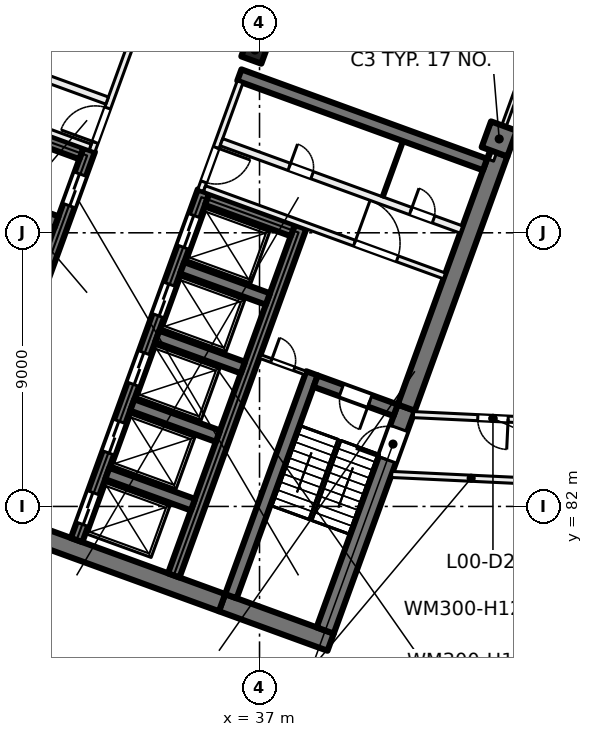
"""IFC4 building model, lengths in metres.
Left out: names, types, materials, properties, quantities, classifications, styles, units other than length and angle.
Written with IfcOpenShell. Run it as: python <this file> out.ifc"""

import sys

from ifc_helpers import new_model, si_unit, direction, frame, frame_2d, origin, origin_2d, place, context, subcontext, project, spatial, rectangle, extrude, element, fill, save


model = new_model("IFC4")
c1 = context("Model", 3, precision=1e-05, world=origin(), true_north=direction((0.0, 1.0)))
c2 = subcontext(c1, "Body", "Model", "MODEL_VIEW")
j1 = project(units=[si_unit("LENGTHUNIT", "METRE"), si_unit("PLANEANGLEUNIT", "RADIAN")], contexts=[c1])
p1 = place(None, origin())
s1 = spatial("IfcSite", under=j1, at=p1, CompositionType="ELEMENT")
p2 = place(p1, origin())
s2 = spatial("IfcBuilding", under=s1, at=p2, CompositionType="ELEMENT")
p3 = place(p2, origin())
s3 = spatial("IfcBuildingStorey", under=s2, at=p3, CompositionType="ELEMENT", Elevation=0.0)
p4 = place(p3, frame((36.849, 97.011, 0.0), z_axis=(0.0, 0.0, 1.0), x_axis=(-0.342020143326, -0.939692620786, 0.0)))
e1 = element("IfcColumn", 1, at=p4, inside=s3, PredefinedType="COLUMN", context=c2, shape_type="SweptSolid", body=[
    extrude(rectangle(XDim=0.7, YDim=0.7, at=origin_2d()), origin(), (0.0, 0.0, 1.0), 7.5),
])
p5 = place(p3, frame((44.884, 94.087, 0.0), z_axis=(0.0, 0.0, 1.0), x_axis=(-0.342020143326, -0.939692620786, 0.0)))
e2 = element("IfcColumn", 2, at=p5, inside=s3, PredefinedType="COLUMN", context=c2, shape_type="SweptSolid", body=[
    extrude(rectangle(XDim=0.9, YDim=0.9, at=origin_2d()), origin(), (0.0, 0.0, 1.0), 7.5),
])
p6 = place(p3, frame((39.338, 77.535, 0.0), z_axis=(0.0, 0.0, 1.0), x_axis=(-0.939701471648, 0.341995824804, 0.0)))
e3 = element("IfcWall", 3, at=p6, inside=s3, PredefinedType="SHEAR", context=c2, shape_type="SweptSolid", body=[
    extrude(rectangle(XDim=3.8, YDim=0.6, at=frame_2d((1.9, 0.0))), origin(), (0.0, 0.0, 1.0), 7.5),
])
p7 = place(p3, frame((35.767, 78.835, 0.0), z_axis=(0.0, 0.0, 1.0), x_axis=(-0.939692894512, 0.342019391267, 0.0)))
e4 = element("IfcWall", 4, at=p7, inside=s3, PredefinedType="SHEAR", context=c2, shape_type="SweptSolid", body=[
    extrude(rectangle(XDim=14.4, YDim=0.6, at=frame_2d((7.2, 0.0))), origin(), (0.0, 0.0, 1.0), 7.5),
])
p8 = place(p3, frame((39.159, 77.92, 0.0), z_axis=(0.0, 0.0, 1.0), x_axis=(0.342016982193, 0.939693771338, 0.0)))
e5 = element("IfcWall", 5, at=p8, inside=s3, PredefinedType="SHEAR", context=c2, shape_type="SweptSolid", body=[
    extrude(rectangle(XDim=7.8, YDim=0.6, at=frame_2d((3.9, 0.0))), origin(), (0.0, 0.0, 1.0), 7.5),
])
p9 = place(p8, frame((5.975, 0.0, 0.0)))
e6 = element("IfcOpeningElement", 6, at=p9, cuts=e5, PredefinedType="OPENING", context=c2, shape_type="SweptSolid", body=[
    extrude(rectangle(XDim=1.1, YDim=2.1, at=frame_2d((0.55, 1.05))), frame((0.0, 0.31, 0.0), z_axis=(0.0, -1.0, 0.0), x_axis=(1.0, 0.0, 0.0)), (0.0, 0.0, 1.0), 0.62),
])
p10 = place(p3, frame((41.827, 85.249, 0.0), z_axis=(0.0, 0.0, 1.0), x_axis=(0.342016162452, 0.939694069696, 0.0)))
e7 = element("IfcWall", 7, at=p10, inside=s3, PredefinedType="SHEAR", context=c2, shape_type="SweptSolid", body=[
    extrude(rectangle(XDim=8.9, YDim=0.6, at=frame_2d((4.45, 0.0))), origin(), (0.0, 0.0, 1.0), 7.5),
])
p11 = place(p3, frame((36.058, 79.048, 0.0), z_axis=(0.0, 0.0, 1.0), x_axis=(0.342016982193, 0.939693771338, 0.0)))
e8 = element("IfcWall", 8, at=p11, inside=s3, PredefinedType="SHEAR", context=c2, shape_type="SweptSolid", body=[
    extrude(rectangle(XDim=7.8, YDim=0.4, at=frame_2d((3.9, 0.0))), origin(), (0.0, 0.0, 1.0), 7.5),
])
p12 = place(p3, frame((41.476, 85.164, 0.0), z_axis=(0.0, 0.0, 1.0), x_axis=(-0.939678810556, 0.342058084236, 0.0)))
e9 = element("IfcWall", 9, at=p12, inside=s3, PredefinedType="SHEAR", context=c2, shape_type="SweptSolid", body=[
    extrude(rectangle(XDim=2.8, YDim=0.4, at=frame_2d((1.4, 0.0))), origin(), (0.0, 0.0, 1.0), 7.5),
])
p13 = place(p12, frame((0.9, 0.0, 0.0)))
e10 = element("IfcOpeningElement", 10, at=p13, cuts=e9, PredefinedType="OPENING", context=c2, shape_type="SweptSolid", body=[
    extrude(rectangle(XDim=1.0, YDim=2.1, at=frame_2d((0.5, 1.05))), frame((0.0, 0.21, 0.0), z_axis=(0.0, -1.0, 0.0), x_axis=(1.0, 0.0, 0.0)), (0.0, 0.0, 1.0), 0.42),
])
p14 = place(p3, frame((30.984, 80.895, 0.0), z_axis=(0.0, 0.0, 1.0), x_axis=(0.342021021735, 0.939692301071, 0.0)))
e11 = element("IfcWall", 11, at=p14, inside=s3, PredefinedType="SHEAR", context=c2, shape_type="SweptSolid", body=[
    extrude(rectangle(XDim=12.2, YDim=0.4, at=frame_2d((6.1, 0.0))), origin(), (0.0, 0.0, 1.0), 7.5),
])
p15 = place(p14, frame((0.55, 0.0, 0.0)))
e12 = element("IfcOpeningElement", 12, at=p15, cuts=e11, PredefinedType="OPENING", context=c2, shape_type="SweptSolid", body=[
    extrude(rectangle(XDim=1.1, YDim=2.1, at=frame_2d((0.55, 1.05))), frame((0.0, 0.21, 0.0), z_axis=(0.0, -1.0, 0.0), x_axis=(1.0, 0.0, 0.0)), (0.0, 0.0, 1.0), 0.42),
])
p16 = place(p14, frame((3.05, 0.0, 0.0)))
e13 = element("IfcOpeningElement", 13, at=p16, cuts=e11, PredefinedType="OPENING", context=c2, shape_type="SweptSolid", body=[
    extrude(rectangle(XDim=1.1, YDim=2.1, at=frame_2d((0.55, 1.05))), frame((0.0, 0.21, 0.0), z_axis=(0.0, -1.0, 0.0), x_axis=(1.0, 0.0, 0.0)), (0.0, 0.0, 1.0), 0.42),
])
p17 = place(p14, frame((5.45, 0.0, 0.0)))
e14 = element("IfcOpeningElement", 14, at=p17, cuts=e11, PredefinedType="OPENING", context=c2, shape_type="SweptSolid", body=[
    extrude(rectangle(XDim=1.1, YDim=2.1, at=frame_2d((0.55, 1.05))), frame((0.0, 0.21, 0.0), z_axis=(0.0, -1.0, 0.0), x_axis=(1.0, 0.0, 0.0)), (0.0, 0.0, 1.0), 0.42),
])
p18 = place(p14, frame((7.85, 0.0, 0.0)))
e15 = element("IfcOpeningElement", 15, at=p18, cuts=e11, PredefinedType="OPENING", context=c2, shape_type="SweptSolid", body=[
    extrude(rectangle(XDim=1.1, YDim=2.1, at=frame_2d((0.55, 1.05))), frame((0.0, 0.21, 0.0), z_axis=(0.0, -1.0, 0.0), x_axis=(1.0, 0.0, 0.0)), (0.0, 0.0, 1.0), 0.42),
])
p19 = place(p14, frame((10.25, 0.0, 0.0)))
e16 = element("IfcOpeningElement", 16, at=p19, cuts=e11, PredefinedType="OPENING", context=c2, shape_type="SweptSolid", body=[
    extrude(rectangle(XDim=1.1, YDim=2.1, at=frame_2d((0.55, 1.05))), frame((0.0, 0.21, 0.0), z_axis=(0.0, -1.0, 0.0), x_axis=(1.0, 0.0, 0.0)), (0.0, 0.0, 1.0), 0.42),
])
p20 = place(p3, frame((34.178, 79.732, 0.0), z_axis=(0.0, 0.0, 1.0), x_axis=(0.342014590177, 0.939694641948, 0.0)))
e17 = element("IfcWall", 17, at=p20, inside=s3, PredefinedType="SHEAR", context=c2, shape_type="SweptSolid", body=[
    extrude(rectangle(XDim=12.2, YDim=0.4, at=frame_2d((6.1, 0.0))), origin(), (0.0, 0.0, 1.0), 7.5),
])
for number, where, z_axis, x_axis in (
    (18, (34.812, 82.056, 0.0), (0.0, 0.0, 1.0), (-0.94, 0.342, 0.0)),
    (19, (35.632, 84.311, 0.0), (0.0, 0.0, 1.0), (-0.94, 0.342, 0.0)),
    (20, (36.453, 86.566, 0.0), (0.0, 0.0, 1.0), (-0.94, 0.342, 0.0)),
    (21, (37.274, 88.822, 0.0), (0.0, 0.0, 1.0), (-0.94, 0.342, 0.0)),
):
    element("IfcWall", number, at=place(p3, frame(where, z_axis=z_axis, x_axis=x_axis)), inside=s3, PredefinedType="SHEAR", context=c2, shape_type="SweptSolid", body=[
        extrude(rectangle(XDim=3.0, YDim=0.4, at=frame_2d((1.5, 0.0))), origin(), (0.0, 0.0, 1.0), 7.5),
    ])
p21 = place(p3, frame((38.095, 91.077, 0.0), z_axis=(0.0, 0.0, 1.0), x_axis=(-0.939676934218, 0.342063238742, 0.0)))
e22 = element("IfcWall", 22, at=p21, inside=s3, PredefinedType="SHEAR", context=c2, shape_type="SweptSolid", body=[
    extrude(rectangle(XDim=3.0, YDim=0.4, at=frame_2d((1.5, 0.0))), origin(), (0.0, 0.0, 1.0), 7.5),
])
p22 = place(p3, frame((27.225, 82.263, 0.0), z_axis=(0.0, 0.0, 1.0), x_axis=(0.342014590177, 0.939694641948, 0.0)))
e23 = element("IfcWall", 23, at=p22, inside=s3, PredefinedType="SHEAR", context=c2, shape_type="SweptSolid", body=[
    extrude(rectangle(XDim=12.2, YDim=0.4, at=frame_2d((6.1, 0.0))), origin(), (0.0, 0.0, 1.0), 7.5),
])
p23 = place(p22, frame((10.25, 0.0, 0.0)))
e24 = element("IfcOpeningElement", 24, at=p23, cuts=e23, PredefinedType="OPENING", context=c2, shape_type="SweptSolid", body=[
    extrude(rectangle(XDim=1.1, YDim=2.1, at=frame_2d((0.55, 1.05))), frame((0.0, 0.21, 0.0), z_axis=(0.0, -1.0, 0.0), x_axis=(1.0, 0.0, 0.0)), (0.0, 0.0, 1.0), 0.42),
])
p24 = place(p22, frame((0.7, 0.0, 0.0)))
e25 = element("IfcOpeningElement", 25, at=p24, cuts=e23, PredefinedType="OPENING", context=c2, shape_type="SweptSolid", body=[
    extrude(rectangle(XDim=0.8, YDim=2.1, at=frame_2d((0.4, 1.05))), frame((0.0, 0.21, 0.0), z_axis=(0.0, -1.0, 0.0), x_axis=(1.0, 0.0, 0.0)), (0.0, 0.0, 1.0), 0.42),
])
for number, where, z_axis, x_axis in (
    (26, (30.32, 91.353, 0.0), (0.0, 0.0, 1.0), (-0.94, 0.342, 0.0)),
    (27, (31.141, 93.608, 0.0), (0.0, 0.0, 1.0), (-0.94, 0.342, 0.0)),
):
    element("IfcWall", number, at=place(p3, frame(where, z_axis=z_axis, x_axis=x_axis)), inside=s3, PredefinedType="SHEAR", context=c2, shape_type="SweptSolid", body=[
        extrude(rectangle(XDim=3.0, YDim=0.4, at=frame_2d((1.5, 0.0))), origin(), (0.0, 0.0, 1.0), 7.5),
    ])
p25 = place(p3, frame((44.418, 93.245, 0.0), z_axis=(0.0, 0.0, 1.0), x_axis=(-0.93969060187, 0.342025690201, 0.0)))
e28 = element("IfcWall", 28, at=p25, inside=s3, PredefinedType="SHEAR", context=c2, shape_type="SweptSolid", body=[
    extrude(rectangle(XDim=8.6, YDim=0.4, at=frame_2d((4.3, 0.0))), origin(), (0.0, 0.0, 1.0), 7.5),
])
p26 = place(p3, frame((31.491, 93.693, 0.0), z_axis=(0.0, 0.0, 1.0), x_axis=(0.341995824804, 0.939701471648, 0.0)))
e29 = element("IfcWall", 29, at=p26, inside=s3, PredefinedType="PARTITIONING", context=c2, shape_type="SweptSolid", body=[
    extrude(rectangle(XDim=3.8, YDim=0.2, at=frame_2d((1.9, 0.0))), origin(), (0.0, 0.0, 1.0), 7.1),
])
p27 = place(p26, frame((0.3, 0.0, 0.0)))
e30 = element("IfcOpeningElement", 30, at=p27, cuts=e29, PredefinedType="OPENING", context=c2, shape_type="SweptSolid", body=[
    extrude(rectangle(XDim=1.2, YDim=2.1, at=frame_2d((0.6, 1.05))), frame((0.0, 0.11, 0.0), z_axis=(0.0, -1.0, 0.0), x_axis=(1.0, 0.0, 0.0)), (0.0, 0.0, 1.0), 0.22),
])
p28 = place(p3, frame((23.538, 96.694, 0.0), z_axis=(0.0, 0.0, 1.0), x_axis=(0.939691552312, -0.342023078919, 0.0)))
e31 = element("IfcWall", 31, at=p28, inside=s3, PredefinedType="PARTITIONING", context=c2, shape_type="SweptSolid", body=[
    extrude(rectangle(XDim=8.4, YDim=0.2, at=frame_2d((4.2, 0.0))), origin(), (0.0, 0.0, 1.0), 7.1),
])
p29 = place(p28, frame((1.65, 0.0, 0.0)))
e32 = element("IfcOpeningElement", 32, at=p29, cuts=e31, PredefinedType="OPENING", context=c2, shape_type="SweptSolid", body=[
    extrude(rectangle(XDim=1.5, YDim=2.1, at=frame_2d((0.75, 1.05))), frame((0.0, 0.11, 0.0), z_axis=(0.0, -1.0, 0.0), x_axis=(1.0, 0.0, 0.0)), (0.0, 0.0, 1.0), 0.22),
])
p30 = place(p3, frame((24.094, 98.221, 0.0), z_axis=(0.0, 0.0, 1.0), x_axis=(0.939691552312, -0.342023078919, 0.0)))
e33 = element("IfcWall", 33, at=p30, inside=s3, PredefinedType="PARTITIONING", context=c2, shape_type="SweptSolid", body=[
    extrude(rectangle(XDim=8.4, YDim=0.25, at=frame_2d((4.2, 0.0))), origin(), (0.0, 0.0, 1.0), 7.1),
])
p31 = place(p30, frame((3.8, 0.0, 0.0)))
e34 = element("IfcOpeningElement", 34, at=p31, cuts=e33, PredefinedType="OPENING", context=c2, shape_type="SweptSolid", body=[
    extrude(rectangle(XDim=0.8, YDim=2.1, at=frame_2d((0.4, 1.05))), frame((0.0, 0.135, 0.0), z_axis=(0.0, -1.0, 0.0), x_axis=(1.0, 0.0, 0.0)), (0.0, 0.0, 1.0), 0.27),
])
p32 = place(p3, frame((36.362, 95.964, 0.0), z_axis=(0.0, 0.0, 1.0), x_axis=(-0.341995824804, -0.939701471648, 0.0)))
e35 = element("IfcWall", 35, at=p32, inside=s3, PredefinedType="PARTITIONING", context=c2, shape_type="SweptSolid", body=[
    extrude(rectangle(XDim=3.8, YDim=0.2, at=frame_2d((1.9, 0.0))), origin(), (0.0, 0.0, 1.0), 7.1),
])
p33 = place(p32, frame((2.3, 0.0, 0.0)))
e36 = element("IfcOpeningElement", 36, at=p33, cuts=e35, PredefinedType="OPENING", context=c2, shape_type="SweptSolid", body=[
    extrude(rectangle(XDim=1.2, YDim=2.1, at=frame_2d((0.6, 1.05))), frame((0.0, 0.11, 0.0), z_axis=(0.0, -1.0, 0.0), x_axis=(1.0, 0.0, 0.0)), (0.0, 0.0, 1.0), 0.22),
])
p34 = place(p3, frame((35.19, 92.453, 0.0), z_axis=(0.0, 0.0, 1.0), x_axis=(0.939691552312, -0.342023078919, 0.0)))
e37 = element("IfcWall", 37, at=p34, inside=s3, PredefinedType="PARTITIONING", context=c2, shape_type="SweptSolid", body=[
    extrude(rectangle(XDim=8.4, YDim=0.2, at=frame_2d((4.2, 0.0))), origin(), (0.0, 0.0, 1.0), 7.1),
])
p35 = place(p34, frame((5.25, 0.0, 0.0)))
e38 = element("IfcOpeningElement", 38, at=p35, cuts=e37, PredefinedType="OPENING", context=c2, shape_type="SweptSolid", body=[
    extrude(rectangle(XDim=1.5, YDim=2.1, at=frame_2d((0.75, 1.05))), frame((0.0, 0.11, 0.0), z_axis=(0.0, -1.0, 0.0), x_axis=(1.0, 0.0, 0.0)), (0.0, 0.0, 1.0), 0.22),
])
p36 = place(p3, frame((35.746, 93.98, 0.0), z_axis=(0.0, 0.0, 1.0), x_axis=(0.939691552312, -0.342023078919, 0.0)))
e39 = element("IfcWall", 39, at=p36, inside=s3, PredefinedType="PARTITIONING", context=c2, shape_type="SweptSolid", body=[
    extrude(rectangle(XDim=8.4, YDim=0.25, at=frame_2d((4.2, 0.0))), origin(), (0.0, 0.0, 1.0), 7.1),
])
p37 = place(p36, frame((2.375, 0.0, 0.0)))
e40 = element("IfcOpeningElement", 40, at=p37, cuts=e39, PredefinedType="OPENING", context=c2, shape_type="SweptSolid", body=[
    extrude(rectangle(XDim=0.8, YDim=2.1, at=frame_2d((0.4, 1.05))), frame((0.0, 0.135, 0.0), z_axis=(0.0, -1.0, 0.0), x_axis=(1.0, 0.0, 0.0)), (0.0, 0.0, 1.0), 0.27),
])
p38 = place(p36, frame((6.625, 0.0, 0.0)))
e41 = element("IfcOpeningElement", 41, at=p38, cuts=e39, PredefinedType="OPENING", context=c2, shape_type="SweptSolid", body=[
    extrude(rectangle(XDim=0.8, YDim=2.1, at=frame_2d((0.4, 1.05))), frame((0.0, 0.135, 0.0), z_axis=(0.0, -1.0, 0.0), x_axis=(1.0, 0.0, 0.0)), (0.0, 0.0, 1.0), 0.27),
])
p39 = place(p3, frame((37.013, 86.935, 0.0), z_axis=(0.0, 0.0, 1.0), x_axis=(0.939659694648, -0.342110593602, 0.0)))
e42 = element("IfcWall", 42, at=p39, inside=s3, PredefinedType="PARTITIONING", context=c2, shape_type="SweptSolid", body=[
    extrude(rectangle(XDim=1.6, YDim=0.125, at=frame_2d((0.8, 0.0))), origin(), (0.0, 0.0, 1.0), 7.1),
])
p40 = place(p39, frame((0.4, 0.0, 0.0)))
e43 = element("IfcOpeningElement", 43, at=p40, cuts=e42, PredefinedType="OPENING", context=c2, shape_type="SweptSolid", body=[
    extrude(rectangle(XDim=0.8, YDim=2.1, at=frame_2d((0.4, 1.05))), frame((0.0, 0.073, 0.0), z_axis=(0.0, -1.0, 0.0), x_axis=(1.0, 0.0, 0.0)), (0.0, 0.0, 1.0), 0.145),
])
p41 = place(p3, frame((41.718, 94.015, 0.0), z_axis=(0.0, 0.0, 1.0), x_axis=(-0.342064742067, -0.939676386973, 0.0)))
e44 = element("IfcWall", 44, at=p41, inside=s3, PredefinedType="PARTITIONING", context=c2, shape_type="SweptSolid", body=[
    extrude(rectangle(XDim=1.95, YDim=0.1, at=frame_2d((0.975, 0.0))), origin(), (0.0, 0.0, 1.0), 7.1),
])
p42 = place(p3, frame((41.347, 83.052, 0.0), z_axis=(0.0, 0.0, 1.0), x_axis=(0.998867926688, -0.04756958097, 0.0)))
e45 = element("IfcWall", 45, at=p42, inside=s3, PredefinedType="PARTITIONING", context=c2, shape_type="SweptSolid", body=[
    extrude(rectangle(XDim=5.235, YDim=0.2, at=frame_2d((2.617, 0.0))), origin(), (0.0, 0.0, 1.0), 7.1),
])
p43 = place(p3, frame((42.063, 85.02, 0.0), z_axis=(0.0, 0.0, 1.0), x_axis=(0.998868348702, -0.047560718685, 0.0)))
e46 = element("IfcWall", 46, at=p43, inside=s3, PredefinedType="PARTITIONING", context=c2, shape_type="SweptSolid", body=[
    extrude(rectangle(XDim=5.236, YDim=0.2, at=frame_2d((2.618, 0.0))), origin(), (0.0, 0.0, 1.0), 7.1),
])
p44 = place(p43, frame((2.118, 0.0, 0.0)))
e47 = element("IfcOpeningElement", 47, at=p44, cuts=e46, PredefinedType="OPENING", context=c2, shape_type="SweptSolid", body=[
    extrude(rectangle(XDim=1.0, YDim=2.1, at=frame_2d((0.5, 1.05))), frame((0.0, 0.11, 0.0), z_axis=(0.0, -1.0, 0.0), x_axis=(1.0, 0.0, 0.0)), (0.0, 0.0, 1.0), 0.22),
])
p45 = place(p3, frame((44.627, 93.382, 0.0), z_axis=(0.0, 0.0, 1.0), x_axis=(0.342025351501, 0.939690725149, 0.0)))
e48 = element("IfcWall", 48, at=p45, inside=s3, PredefinedType="PARTITIONING", context=c2, shape_type="SweptSolid", body=[
    extrude(rectangle(XDim=5.0, YDim=0.15, at=frame_2d((2.5, 0.0))), origin(), (0.0, 0.0, 1.0), 7.1),
])
p46 = place(p23, origin())
e49 = element("IfcDoor", 49, at=p46, inside=s3, OperationType="DOUBLE_DOOR_SLIDING", PredefinedType="DOOR", context=c2, shape_type="SweptSolid", body=[
    extrude(rectangle(XDim=1.1, YDim=2.1, at=frame_2d((0.55, 1.05))), frame((0.0, 0.025, 0.0), z_axis=(0.0, -1.0, 0.0), x_axis=(1.0, 0.0, 0.0)), (0.0, 0.0, 1.0), 0.05),
])
fill(e24, e49)
p47 = place(p15, origin())
e50 = element("IfcDoor", 50, at=p47, inside=s3, OperationType="DOUBLE_DOOR_SLIDING", PredefinedType="DOOR", context=c2, shape_type="SweptSolid", body=[
    extrude(rectangle(XDim=1.1, YDim=2.1, at=frame_2d((0.55, 1.05))), frame((0.0, 0.025, 0.0), z_axis=(0.0, -1.0, 0.0), x_axis=(1.0, 0.0, 0.0)), (0.0, 0.0, 1.0), 0.05),
])
fill(e12, e50)
p48 = place(p16, origin())
e51 = element("IfcDoor", 51, at=p48, inside=s3, OperationType="DOUBLE_DOOR_SLIDING", PredefinedType="DOOR", context=c2, shape_type="SweptSolid", body=[
    extrude(rectangle(XDim=1.1, YDim=2.1, at=frame_2d((0.55, 1.05))), frame((0.0, 0.025, 0.0), z_axis=(0.0, -1.0, 0.0), x_axis=(1.0, 0.0, 0.0)), (0.0, 0.0, 1.0), 0.05),
])
fill(e13, e51)
p49 = place(p17, origin())
e52 = element("IfcDoor", 52, at=p49, inside=s3, OperationType="DOUBLE_DOOR_SLIDING", PredefinedType="DOOR", context=c2, shape_type="SweptSolid", body=[
    extrude(rectangle(XDim=1.1, YDim=2.1, at=frame_2d((0.55, 1.05))), frame((0.0, 0.025, 0.0), z_axis=(0.0, -1.0, 0.0), x_axis=(1.0, 0.0, 0.0)), (0.0, 0.0, 1.0), 0.05),
])
fill(e14, e52)
p50 = place(p18, origin())
e53 = element("IfcDoor", 53, at=p50, inside=s3, OperationType="DOUBLE_DOOR_SLIDING", PredefinedType="DOOR", context=c2, shape_type="SweptSolid", body=[
    extrude(rectangle(XDim=1.1, YDim=2.1, at=frame_2d((0.55, 1.05))), frame((0.0, 0.025, 0.0), z_axis=(0.0, -1.0, 0.0), x_axis=(1.0, 0.0, 0.0)), (0.0, 0.0, 1.0), 0.05),
])
fill(e15, e53)
p51 = place(p19, origin())
e54 = element("IfcDoor", 54, at=p51, inside=s3, OperationType="DOUBLE_DOOR_SLIDING", PredefinedType="DOOR", context=c2, shape_type="SweptSolid", body=[
    extrude(rectangle(XDim=1.1, YDim=2.1, at=frame_2d((0.55, 1.05))), frame((0.0, 0.025, 0.0), z_axis=(0.0, -1.0, 0.0), x_axis=(1.0, 0.0, 0.0)), (0.0, 0.0, 1.0), 0.05),
])
fill(e16, e54)
p52 = place(p27, origin())
e55 = element("IfcDoor", 55, at=p52, inside=s3, OperationType="DOUBLE_DOOR_SINGLE_SWING", PredefinedType="DOOR", context=c2, shape_type="SweptSolid", body=[
    extrude(rectangle(XDim=1.2, YDim=2.1, at=frame_2d((0.6, 1.05))), frame((0.0, 0.025, 0.0), z_axis=(0.0, -1.0, 0.0), x_axis=(1.0, 0.0, 0.0)), (0.0, 0.0, 1.0), 0.05),
])
fill(e30, e55)
p53 = place(p33, origin())
e56 = element("IfcDoor", 56, at=p53, inside=s3, OperationType="DOUBLE_DOOR_SINGLE_SWING", PredefinedType="DOOR", context=c2, shape_type="SweptSolid", body=[
    extrude(rectangle(XDim=1.2, YDim=2.1, at=frame_2d((0.6, 1.05))), frame((0.0, 0.025, 0.0), z_axis=(0.0, -1.0, 0.0), x_axis=(1.0, 0.0, 0.0)), (0.0, 0.0, 1.0), 0.05),
])
fill(e36, e56)
p54 = place(p35, origin())
e57 = element("IfcDoor", 57, at=p54, inside=s3, OperationType="DOUBLE_DOOR_SINGLE_SWING", PredefinedType="DOOR", context=c2, shape_type="SweptSolid", body=[
    extrude(rectangle(XDim=1.5, YDim=2.1, at=frame_2d((0.75, 1.05))), frame((0.0, 0.025, 0.0), z_axis=(0.0, -1.0, 0.0), x_axis=(1.0, 0.0, 0.0)), (0.0, 0.0, 1.0), 0.05),
])
fill(e38, e57)
p55 = place(p13, origin())
e58 = element("IfcDoor", 58, at=p55, inside=s3, OperationType="SINGLE_SWING_RIGHT", PredefinedType="DOOR", context=c2, shape_type="SweptSolid", body=[
    extrude(rectangle(XDim=1.0, YDim=2.1, at=frame_2d((0.5, 1.05))), frame((0.0, 0.025, 0.0), z_axis=(0.0, -1.0, 0.0), x_axis=(1.0, 0.0, 0.0)), (0.0, 0.0, 1.0), 0.05),
])
fill(e10, e58)
p56 = place(p40, origin())
e59 = element("IfcDoor", 59, at=p56, inside=s3, OperationType="SINGLE_SWING_LEFT", PredefinedType="DOOR", context=c2, shape_type="SweptSolid", body=[
    extrude(rectangle(XDim=0.8, YDim=2.1, at=frame_2d((0.4, 1.05))), frame((0.0, 0.025, 0.0), z_axis=(0.0, -1.0, 0.0), x_axis=(1.0, 0.0, 0.0)), (0.0, 0.0, 1.0), 0.05),
])
fill(e43, e59)
p57 = place(p37, origin())
e60 = element("IfcDoor", 60, at=p57, inside=s3, OperationType="SINGLE_SWING_RIGHT", PredefinedType="DOOR", context=c2, shape_type="SweptSolid", body=[
    extrude(rectangle(XDim=0.8, YDim=2.1, at=frame_2d((0.4, 1.05))), frame((0.0, 0.025, 0.0), z_axis=(0.0, -1.0, 0.0), x_axis=(1.0, 0.0, 0.0)), (0.0, 0.0, 1.0), 0.05),
])
fill(e40, e60)
p58 = place(p38, origin())
e61 = element("IfcDoor", 61, at=p58, inside=s3, OperationType="SINGLE_SWING_LEFT", PredefinedType="DOOR", context=c2, shape_type="SweptSolid", body=[
    extrude(rectangle(XDim=0.8, YDim=2.1, at=frame_2d((0.4, 1.05))), frame((0.0, 0.025, 0.0), z_axis=(0.0, -1.0, 0.0), x_axis=(1.0, 0.0, 0.0)), (0.0, 0.0, 1.0), 0.05),
])
fill(e41, e61)
p59 = place(p9, origin())
e62 = element("IfcDoor", 62, at=p59, inside=s3, OperationType="SINGLE_SWING_LEFT", PredefinedType="DOOR", context=c2, shape_type="SweptSolid", body=[
    extrude(rectangle(XDim=1.1, YDim=2.1, at=frame_2d((0.55, 1.05))), frame((0.0, 0.025, 0.0), z_axis=(0.0, -1.0, 0.0), x_axis=(1.0, 0.0, 0.0)), (0.0, 0.0, 1.0), 0.05),
])
fill(e6, e62)
p60 = place(p44, origin())
e63 = element("IfcDoor", 63, at=p60, inside=s3, OperationType="SINGLE_SWING_RIGHT", PredefinedType="DOOR", context=c2, shape_type="SweptSolid", body=[
    extrude(rectangle(XDim=1.0, YDim=2.1, at=frame_2d((0.5, 1.05))), frame((0.0, 0.025, 0.0), z_axis=(0.0, -1.0, 0.0), x_axis=(1.0, 0.0, 0.0)), (0.0, 0.0, 1.0), 0.05),
])
fill(e47, e63)
save(model, sys.argv[1])
